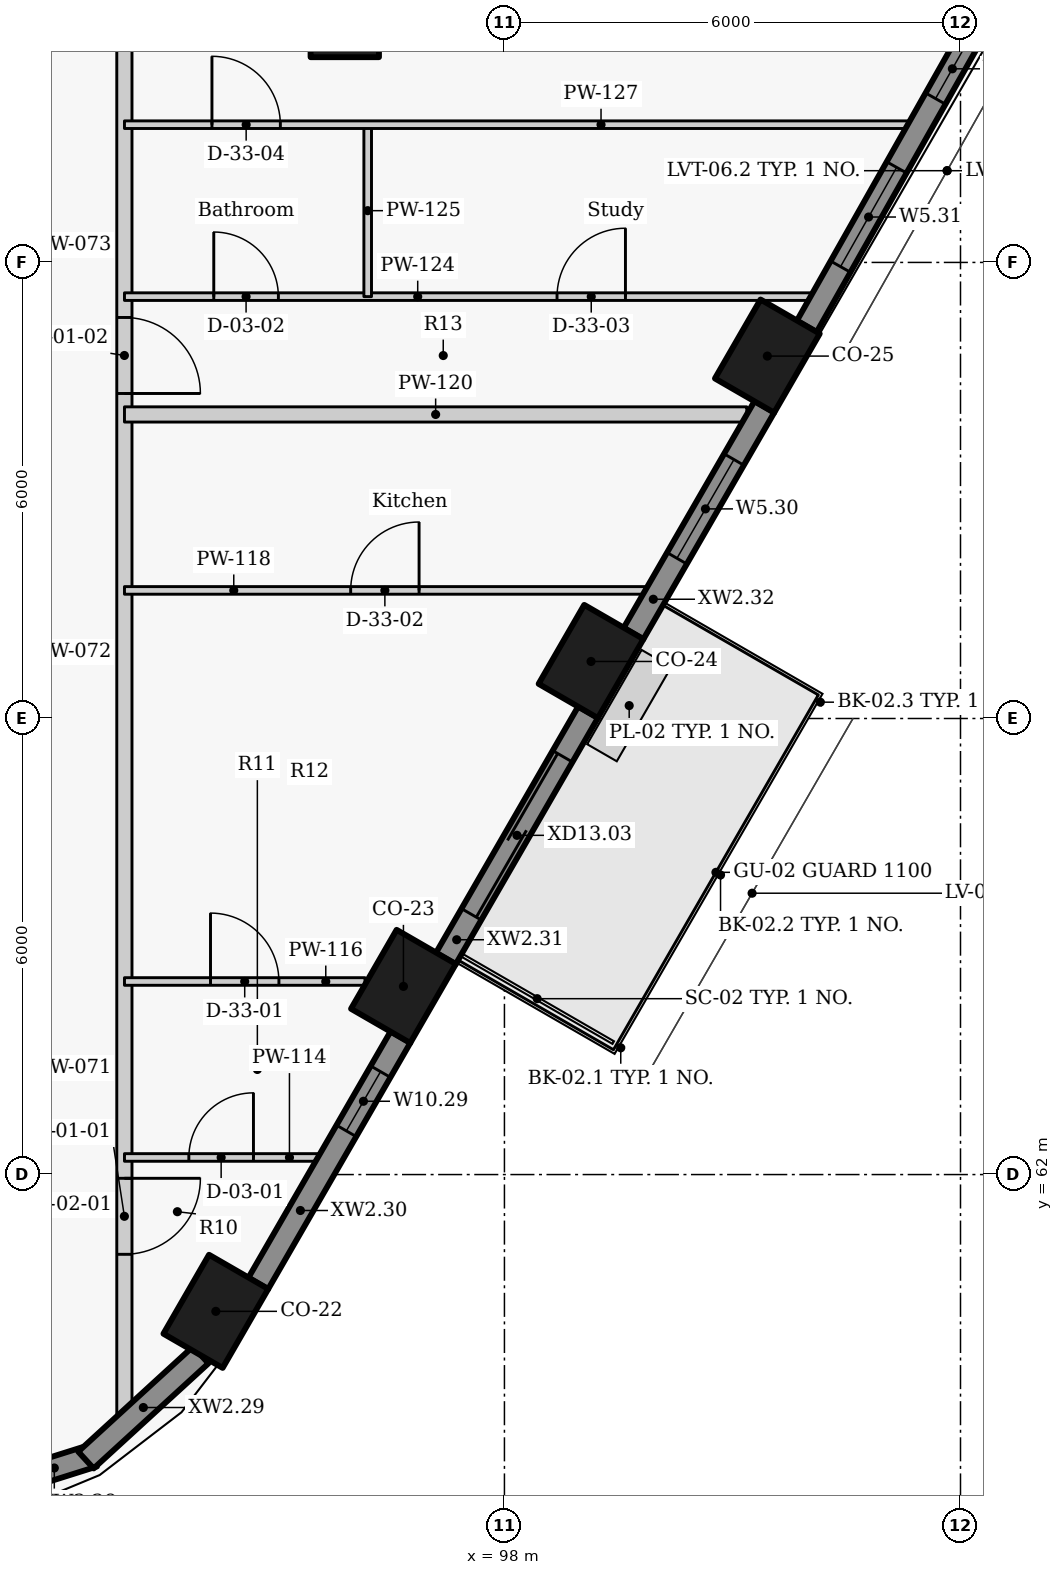
"""IFC4 building model, lengths in metres.
Left out: names, types, materials, properties, quantities, classifications, styles, units other than length and angle.
Written with IfcOpenShell. Run it as: python <this file> out.ifc"""

import sys

from ifc_helpers import new_model, si_unit, direction, frame, frame_2d, origin, origin_2d, place, context, subcontext, project, spatial, rectangle, extrude, element, fill, save


model = new_model("IFC4")
c1 = context("Model", 3, precision=1e-05, world=origin(), true_north=direction((0.0, 1.0)))
c2 = subcontext(c1, "Body", "Model", "MODEL_VIEW")
j1 = project(units=[si_unit("LENGTHUNIT", "METRE"), si_unit("PLANEANGLEUNIT", "RADIAN")], contexts=[c1])
p1 = place(None, origin())
s1 = spatial("IfcSite", under=j1, at=p1, CompositionType="ELEMENT")
p2 = place(p1, origin())
s2 = spatial("IfcBuilding", under=s1, at=p2, CompositionType="ELEMENT")
p3 = place(p2, frame((0.0, 0.0, 180.0)))
s3 = spatial("IfcBuildingStorey", under=s2, at=p3, CompositionType="ELEMENT", Elevation=180.0)
for number, where, z_axis, x_axis in (
    (1, (94.203, 60.2, 0.0), (0.0, 0.0, 1.0), (0.5, 0.866, 0.0)),
    (2, (96.671, 64.475, 0.0), (0.0, 0.0, 1.0), (0.5, 0.866, 0.0)),
    (3, (99.139, 68.75, 0.0), (0.0, 0.0, 1.0), (0.5, 0.866, 0.0)),
    (4, (101.459, 72.768, 0.0), (0.0, 0.0, 1.0), (0.5, 0.866, 0.0)),
    (5, (95.899, 77.3, 0.0), (0.0, 0.0, 1.0), (0.0, 1.0, 0.0)),
):
    element("IfcColumn", number, at=place(p3, frame(where, z_axis=z_axis, x_axis=x_axis)), inside=s3, PredefinedType="COLUMN", context=c2, shape_type="SweptSolid", body=[
        extrude(rectangle(XDim=1.2, YDim=0.9, at=origin_2d()), origin(), (0.0, 0.0, 1.0), 3.3),
    ])
p4 = place(p3, frame((90.636, 57.685, 0.0), z_axis=(0.0, 0.0, 1.0), x_axis=(0.95368324118, 0.300812691707, 0.0)))
e6 = element("IfcWall", 6, at=p4, inside=s3, PredefinedType="SOLIDWALL", context=c2, shape_type="SweptSolid", body=[
    extrude(rectangle(XDim=2.053, YDim=0.3, at=frame_2d((1.027, 0.0))), origin(), (0.0, 0.0, 1.0), 2.425),
])
p5 = place(p4, frame((0.271, 0.0, 0.9)))
e7 = element("IfcOpeningElement", 7, at=p5, cuts=e6, PredefinedType="OPENING", context=c2, shape_type="SweptSolid", body=[
    extrude(rectangle(XDim=0.6, YDim=1.1, at=frame_2d((0.3, 0.55))), frame((0.0, 0.16, 0.0), z_axis=(0.0, -1.0, 0.0), x_axis=(1.0, 0.0, 0.0)), (0.0, 0.0, 1.0), 0.32),
])
p6 = place(p3, frame((92.494, 58.244, 0.0), z_axis=(0.0, 0.0, 1.0), x_axis=(0.73764876128, 0.675184645102, 0.0)))
e8 = element("IfcWall", 8, at=p6, inside=s3, PredefinedType="SOLIDWALL", context=c2, shape_type="SweptSolid", body=[
    extrude(rectangle(XDim=2.048, YDim=0.3, at=frame_2d((1.024, 0.0))), origin(), (0.0, 0.0, 1.0), 2.425),
])
p7 = place(p3, frame((94.761, 60.567, 0.0), z_axis=(0.0, 0.0, 1.0), x_axis=(0.499982088007, 0.866035745032, 0.0)))
e9 = element("IfcWall", 9, at=p7, inside=s3, PredefinedType="SOLIDWALL", context=c2, shape_type="SweptSolid", body=[
    extrude(rectangle(XDim=3.744, YDim=0.3, at=frame_2d((1.872, 0.0))), origin(), (0.0, 0.0, 1.0), 2.425),
])
p8 = place(p7, frame((2.319, 0.0, 1.5)))
e10 = element("IfcOpeningElement", 10, at=p8, cuts=e9, PredefinedType="OPENING", context=c2, shape_type="SweptSolid", body=[
    extrude(rectangle(XDim=0.9, YDim=0.5, at=frame_2d((0.45, 0.25))), frame((0.0, 0.16, 0.0), z_axis=(0.0, -1.0, 0.0), x_axis=(1.0, 0.0, 0.0)), (0.0, 0.0, 1.0), 0.32),
])
p9 = place(p3, frame((97.229, 64.842, 0.0), z_axis=(0.0, 0.0, 1.0), x_axis=(0.500059225181, 0.86599120741, 0.0)))
e11 = element("IfcWall", 11, at=p9, inside=s3, PredefinedType="SOLIDWALL", context=c2, shape_type="SweptSolid", body=[
    extrude(rectangle(XDim=3.744, YDim=0.3, at=frame_2d((1.872, 0.0))), origin(), (0.0, 0.0, 1.0), 2.425),
])
p10 = place(p9, frame((0.672, 0.0, 0.0)))
e12 = element("IfcOpeningElement", 12, at=p10, cuts=e11, PredefinedType="OPENING", context=c2, shape_type="SweptSolid", body=[
    extrude(rectangle(XDim=2.4, YDim=2.0, at=frame_2d((1.2, 1.0))), frame((0.0, 0.16, 0.0), z_axis=(0.0, -1.0, 0.0), x_axis=(1.0, 0.0, 0.0)), (0.0, 0.0, 1.0), 0.32),
])
p11 = place(p3, frame((99.697, 69.116, 0.0), z_axis=(0.0, 0.0, 1.0), x_axis=(0.499955427682, 0.866051136095, 0.0)))
e13 = element("IfcWall", 13, at=p11, inside=s3, PredefinedType="SOLIDWALL", context=c2, shape_type="SweptSolid", body=[
    extrude(rectangle(XDim=3.447, YDim=0.3, at=frame_2d((1.724, 0.0))), origin(), (0.0, 0.0, 1.0), 2.425),
])
p12 = place(p11, frame((1.145, 0.0, 0.9)))
e14 = element("IfcOpeningElement", 14, at=p12, cuts=e13, PredefinedType="OPENING", context=c2, shape_type="SweptSolid", body=[
    extrude(rectangle(XDim=1.5, YDim=1.1, at=frame_2d((0.75, 0.55))), frame((0.0, 0.16, 0.0), z_axis=(0.0, -1.0, 0.0), x_axis=(1.0, 0.0, 0.0)), (0.0, 0.0, 1.0), 0.32),
])
p13 = place(p3, frame((101.977, 73.157, 0.0), z_axis=(0.0, 0.0, 1.0), x_axis=(0.492033360928, 0.870576344575, 0.0)))
e15 = element("IfcWall", 15, at=p13, inside=s3, PredefinedType="SOLIDWALL", context=c2, shape_type="SweptSolid", body=[
    extrude(rectangle(XDim=5.387, YDim=0.3, at=frame_2d((2.693, 0.0))), origin(), (0.0, 0.0, 1.0), 2.425),
])
p14 = place(p13, frame((0.905, 0.0, 0.9)))
e16 = element("IfcOpeningElement", 16, at=p14, cuts=e15, PredefinedType="OPENING", context=c2, shape_type="SweptSolid", body=[
    extrude(rectangle(XDim=1.5, YDim=1.1, at=frame_2d((0.75, 0.55))), frame((0.0, 0.16, 0.0), z_axis=(0.0, -1.0, 0.0), x_axis=(1.0, 0.0, 0.0)), (0.0, 0.0, 1.0), 0.32),
])
p15 = place(p13, frame((3.444, 0.0, 0.9)))
e17 = element("IfcOpeningElement", 17, at=p15, cuts=e15, PredefinedType="OPENING", context=c2, shape_type="SweptSolid", body=[
    extrude(rectangle(XDim=0.9, YDim=1.1, at=frame_2d((0.45, 0.55))), frame((0.0, 0.16, 0.0), z_axis=(0.0, -1.0, 0.0), x_axis=(1.0, 0.0, 0.0)), (0.0, 0.0, 1.0), 0.32),
])
p16 = place(p3, frame((93.0, 101.281, 0.0), z_axis=(0.0, 0.0, 1.0), x_axis=(0.0, -1.0, 0.0)))
e18 = element("IfcWall", 18, at=p16, inside=s3, PredefinedType="PARTITIONING", context=c2, shape_type="SweptSolid", body=[
    extrude(rectangle(XDim=42.606, YDim=0.2, at=frame_2d((21.303, 0.0))), origin(), (0.0, 0.0, 1.0), 2.405),
])
p17 = place(p16, frame((39.33, 0.0, 0.0)))
e19 = element("IfcOpeningElement", 19, at=p17, cuts=e18, PredefinedType="OPENING", context=c2, shape_type="SweptSolid", body=[
    extrude(rectangle(XDim=1.0, YDim=2.1, at=frame_2d((0.5, 1.05))), frame((0.0, 0.11, 0.0), z_axis=(0.0, -1.0, 0.0), x_axis=(1.0, 0.0, 0.0)), (0.0, 0.0, 1.0), 0.22),
])
p18 = place(p16, frame((28.005, 0.0, 0.0)))
e20 = element("IfcOpeningElement", 20, at=p18, cuts=e18, PredefinedType="OPENING", context=c2, shape_type="SweptSolid", body=[
    extrude(rectangle(XDim=1.0, YDim=2.1, at=frame_2d((0.5, 1.05))), frame((0.0, 0.11, 0.0), z_axis=(0.0, -1.0, 0.0), x_axis=(1.0, 0.0, 0.0)), (0.0, 0.0, 1.0), 0.22),
])
p19 = place(p16, frame((16.905, 0.0, 0.0)))
e21 = element("IfcOpeningElement", 21, at=p19, cuts=e18, PredefinedType="OPENING", context=c2, shape_type="SweptSolid", body=[
    extrude(rectangle(XDim=1.0, YDim=2.1, at=frame_2d((0.5, 1.05))), frame((0.0, 0.11, 0.0), z_axis=(0.0, -1.0, 0.0), x_axis=(1.0, 0.0, 0.0)), (0.0, 0.0, 1.0), 0.22),
])
p20 = place(p3, frame((93.001, 62.225, 0.0), z_axis=(0.0, 0.0, 1.0), x_axis=(1.0, 0.0, 0.0)))
e22 = element("IfcWall", 22, at=p20, inside=s3, PredefinedType="PARTITIONING", context=c2, shape_type="SweptSolid", body=[
    extrude(rectangle(XDim=2.544, YDim=0.1, at=frame_2d((1.272, 0.0))), origin(), (0.0, 0.0, 1.0), 2.405),
])
p21 = place(p20, frame((0.847, 0.0, 0.0)))
e23 = element("IfcOpeningElement", 23, at=p21, cuts=e22, PredefinedType="OPENING", context=c2, shape_type="SweptSolid", body=[
    extrude(rectangle(XDim=0.85, YDim=2.1, at=frame_2d((0.425, 1.05))), frame((0.0, 0.06, 0.0), z_axis=(0.0, -1.0, 0.0), x_axis=(1.0, 0.0, 0.0)), (0.0, 0.0, 1.0), 0.12),
])
p22 = place(p3, frame((93.001, 64.54, 0.0), z_axis=(0.0, 0.0, 1.0), x_axis=(1.0, 0.0, 0.0)))
e24 = element("IfcWall", 24, at=p22, inside=s3, PredefinedType="PARTITIONING", context=c2, shape_type="SweptSolid", body=[
    extrude(rectangle(XDim=3.165, YDim=0.1, at=frame_2d((1.583, 0.0))), origin(), (0.0, 0.0, 1.0), 3.025),
])
p23 = place(p22, frame((1.132, 0.0, 0.0)))
e25 = element("IfcOpeningElement", 25, at=p23, cuts=e24, PredefinedType="OPENING", context=c2, shape_type="SweptSolid", body=[
    extrude(rectangle(XDim=0.9, YDim=2.1, at=frame_2d((0.45, 1.05))), frame((0.0, 0.06, 0.0), z_axis=(0.0, -1.0, 0.0), x_axis=(1.0, 0.0, 0.0)), (0.0, 0.0, 1.0), 0.12),
])
p24 = place(p3, frame((93.001, 69.685, 0.0), z_axis=(0.0, 0.0, 1.0), x_axis=(1.0, 0.0, 0.0)))
e26 = element("IfcWall", 26, at=p24, inside=s3, PredefinedType="PARTITIONING", context=c2, shape_type="SweptSolid", body=[
    extrude(rectangle(XDim=6.851, YDim=0.1, at=frame_2d((3.426, 0.0))), origin(), (0.0, 0.0, 1.0), 2.405),
])
p25 = place(p24, frame((2.976, 0.0, 0.0)))
e27 = element("IfcOpeningElement", 27, at=p25, cuts=e26, PredefinedType="OPENING", context=c2, shape_type="SweptSolid", body=[
    extrude(rectangle(XDim=0.9, YDim=2.1, at=frame_2d((0.45, 1.05))), frame((0.0, 0.06, 0.0), z_axis=(0.0, -1.0, 0.0), x_axis=(1.0, 0.0, 0.0)), (0.0, 0.0, 1.0), 0.12),
])
p26 = place(p3, frame((93.001, 72.0, 0.0), z_axis=(0.0, 0.0, 1.0), x_axis=(1.0, 0.0, 0.0)))
e28 = element("IfcWall", 28, at=p26, inside=s3, PredefinedType="PARTITIONING", context=c2, shape_type="SweptSolid", body=[
    extrude(rectangle(XDim=8.188, YDim=0.2, at=frame_2d((4.094, 0.0))), origin(), (0.0, 0.0, 1.0), 2.405),
])
p27 = place(p3, frame((93.001, 73.55, 0.0), z_axis=(0.0, 0.0, 1.0), x_axis=(1.0, 0.0, 0.0)))
e29 = element("IfcWall", 29, at=p27, inside=s3, PredefinedType="PARTITIONING", context=c2, shape_type="SweptSolid", body=[
    extrude(rectangle(XDim=9.083, YDim=0.1, at=frame_2d((4.542, 0.0))), origin(), (0.0, 0.0, 1.0), 2.405),
])
p28 = place(p27, frame((1.175, 0.0, 0.0)))
e30 = element("IfcOpeningElement", 30, at=p28, cuts=e29, PredefinedType="OPENING", context=c2, shape_type="SweptSolid", body=[
    extrude(rectangle(XDim=0.85, YDim=2.1, at=frame_2d((0.425, 1.05))), frame((0.0, 0.06, 0.0), z_axis=(0.0, -1.0, 0.0), x_axis=(1.0, 0.0, 0.0)), (0.0, 0.0, 1.0), 0.12),
])
p29 = place(p27, frame((5.691, 0.0, 0.0)))
e31 = element("IfcOpeningElement", 31, at=p29, cuts=e29, PredefinedType="OPENING", context=c2, shape_type="SweptSolid", body=[
    extrude(rectangle(XDim=0.9, YDim=2.1, at=frame_2d((0.45, 1.05))), frame((0.0, 0.06, 0.0), z_axis=(0.0, -1.0, 0.0), x_axis=(1.0, 0.0, 0.0)), (0.0, 0.0, 1.0), 0.12),
])
p30 = place(p3, frame((96.201, 73.55, 0.0), z_axis=(0.0, 0.0, 1.0), x_axis=(0.0, 1.0, 0.0)))
e32 = element("IfcWall", 32, at=p30, inside=s3, PredefinedType="PARTITIONING", context=c2, shape_type="SweptSolid", body=[
    extrude(rectangle(XDim=2.262, YDim=0.1, at=frame_2d((1.131, 0.0))), origin(), (0.0, 0.0, 1.0), 3.025),
])
p31 = place(p3, frame((93.001, 75.812, 0.0), z_axis=(0.0, 0.0, 1.0), x_axis=(1.0, 0.0, 0.0)))
e33 = element("IfcWall", 33, at=p31, inside=s3, PredefinedType="PARTITIONING", context=c2, shape_type="SweptSolid", body=[
    extrude(rectangle(XDim=10.389, YDim=0.1, at=frame_2d((5.194, 0.0))), origin(), (0.0, 0.0, 1.0), 2.405),
])
p32 = place(p31, frame((1.151, 0.0, 0.0)))
e34 = element("IfcOpeningElement", 34, at=p32, cuts=e33, PredefinedType="OPENING", context=c2, shape_type="SweptSolid", body=[
    extrude(rectangle(XDim=0.9, YDim=2.1, at=frame_2d((0.45, 1.05))), frame((0.0, 0.06, 0.0), z_axis=(0.0, -1.0, 0.0), x_axis=(1.0, 0.0, 0.0)), (0.0, 0.0, 1.0), 0.12),
])
p33 = place(p8, origin())
e35 = element("IfcWindow", 35, at=p33, inside=s3, PartitioningType="SINGLE_PANEL", PredefinedType="WINDOW", context=c2, shape_type="SweptSolid", body=[
    extrude(rectangle(XDim=0.9, YDim=0.5, at=frame_2d((0.45, 0.25))), frame((0.0, 0.03, 0.0), z_axis=(0.0, -1.0, 0.0), x_axis=(1.0, 0.0, 0.0)), (0.0, 0.0, 1.0), 0.06),
])
fill(e10, e35)
p34 = place(p10, origin())
e36 = element("IfcDoor", 36, at=p34, inside=s3, OperationType="DOUBLE_DOOR_SLIDING", PredefinedType="DOOR", context=c2, shape_type="SweptSolid", body=[
    extrude(rectangle(XDim=2.4, YDim=2.0, at=frame_2d((1.2, 1.0))), frame((0.0, 0.025, 0.0), z_axis=(0.0, -1.0, 0.0), x_axis=(1.0, 0.0, 0.0)), (0.0, 0.0, 1.0), 0.05),
])
fill(e12, e36)
p35 = place(p12, origin())
e37 = element("IfcWindow", 37, at=p35, inside=s3, PartitioningType="SINGLE_PANEL", PredefinedType="WINDOW", context=c2, shape_type="SweptSolid", body=[
    extrude(rectangle(XDim=1.5, YDim=1.1, at=frame_2d((0.75, 0.55))), frame((0.0, 0.03, 0.0), z_axis=(0.0, -1.0, 0.0), x_axis=(1.0, 0.0, 0.0)), (0.0, 0.0, 1.0), 0.06),
])
fill(e14, e37)
p36 = place(p14, origin())
e38 = element("IfcWindow", 38, at=p36, inside=s3, PartitioningType="SINGLE_PANEL", PredefinedType="WINDOW", context=c2, shape_type="SweptSolid", body=[
    extrude(rectangle(XDim=1.5, YDim=1.1, at=frame_2d((0.75, 0.55))), frame((0.0, 0.03, 0.0), z_axis=(0.0, -1.0, 0.0), x_axis=(1.0, 0.0, 0.0)), (0.0, 0.0, 1.0), 0.06),
])
fill(e16, e38)
p37 = place(p15, origin())
e39 = element("IfcWindow", 39, at=p37, inside=s3, PartitioningType="SINGLE_PANEL", PredefinedType="WINDOW", context=c2, shape_type="SweptSolid", body=[
    extrude(rectangle(XDim=0.9, YDim=1.1, at=frame_2d((0.45, 0.55))), frame((0.0, 0.03, 0.0), z_axis=(0.0, -1.0, 0.0), x_axis=(1.0, 0.0, 0.0)), (0.0, 0.0, 1.0), 0.06),
])
fill(e17, e39)
p38 = place(p17, origin())
e40 = element("IfcDoor", 40, at=p38, inside=s3, OperationType="SINGLE_SWING_LEFT", PredefinedType="DOOR", context=c2, shape_type="SweptSolid", body=[
    extrude(rectangle(XDim=1.0, YDim=2.1, at=frame_2d((0.5, 1.05))), frame((0.0, 0.025, 0.0), z_axis=(0.0, -1.0, 0.0), x_axis=(1.0, 0.0, 0.0)), (0.0, 0.0, 1.0), 0.05),
])
fill(e19, e40)
p39 = place(p21, origin())
e41 = element("IfcDoor", 41, at=p39, inside=s3, OperationType="SINGLE_SWING_RIGHT", PredefinedType="DOOR", context=c2, shape_type="SweptSolid", body=[
    extrude(rectangle(XDim=0.85, YDim=2.1, at=frame_2d((0.425, 1.05))), frame((0.0, 0.025, 0.0), z_axis=(0.0, -1.0, 0.0), x_axis=(1.0, 0.0, 0.0)), (0.0, 0.0, 1.0), 0.05),
])
fill(e23, e41)
p40 = place(p23, origin())
e42 = element("IfcDoor", 42, at=p40, inside=s3, OperationType="SINGLE_SWING_LEFT", PredefinedType="DOOR", context=c2, shape_type="SweptSolid", body=[
    extrude(rectangle(XDim=0.9, YDim=2.1, at=frame_2d((0.45, 1.05))), frame((0.0, 0.025, 0.0), z_axis=(0.0, -1.0, 0.0), x_axis=(1.0, 0.0, 0.0)), (0.0, 0.0, 1.0), 0.05),
])
fill(e25, e42)
p41 = place(p25, origin())
e43 = element("IfcDoor", 43, at=p41, inside=s3, OperationType="SINGLE_SWING_RIGHT", PredefinedType="DOOR", context=c2, shape_type="SweptSolid", body=[
    extrude(rectangle(XDim=0.9, YDim=2.1, at=frame_2d((0.45, 1.05))), frame((0.0, 0.025, 0.0), z_axis=(0.0, -1.0, 0.0), x_axis=(1.0, 0.0, 0.0)), (0.0, 0.0, 1.0), 0.05),
])
fill(e27, e43)
p42 = place(p18, origin())
e44 = element("IfcDoor", 44, at=p42, inside=s3, OperationType="SINGLE_SWING_RIGHT", PredefinedType="DOOR", context=c2, shape_type="SweptSolid", body=[
    extrude(rectangle(XDim=1.0, YDim=2.1, at=frame_2d((0.5, 1.05))), frame((0.0, 0.025, 0.0), z_axis=(0.0, -1.0, 0.0), x_axis=(1.0, 0.0, 0.0)), (0.0, 0.0, 1.0), 0.05),
])
fill(e20, e44)
p43 = place(p28, origin())
e45 = element("IfcDoor", 45, at=p43, inside=s3, OperationType="SINGLE_SWING_LEFT", PredefinedType="DOOR", context=c2, shape_type="SweptSolid", body=[
    extrude(rectangle(XDim=0.85, YDim=2.1, at=frame_2d((0.425, 1.05))), frame((0.0, 0.025, 0.0), z_axis=(0.0, -1.0, 0.0), x_axis=(1.0, 0.0, 0.0)), (0.0, 0.0, 1.0), 0.05),
])
fill(e30, e45)
p44 = place(p29, origin())
e46 = element("IfcDoor", 46, at=p44, inside=s3, OperationType="SINGLE_SWING_RIGHT", PredefinedType="DOOR", context=c2, shape_type="SweptSolid", body=[
    extrude(rectangle(XDim=0.9, YDim=2.1, at=frame_2d((0.45, 1.05))), frame((0.0, 0.025, 0.0), z_axis=(0.0, -1.0, 0.0), x_axis=(1.0, 0.0, 0.0)), (0.0, 0.0, 1.0), 0.05),
])
fill(e31, e46)
p45 = place(p32, origin())
e47 = element("IfcDoor", 47, at=p45, inside=s3, OperationType="SINGLE_SWING_LEFT", PredefinedType="DOOR", context=c2, shape_type="SweptSolid", body=[
    extrude(rectangle(XDim=0.9, YDim=2.1, at=frame_2d((0.45, 1.05))), frame((0.0, 0.025, 0.0), z_axis=(0.0, -1.0, 0.0), x_axis=(1.0, 0.0, 0.0)), (0.0, 0.0, 1.0), 0.05),
])
fill(e34, e47)
save(model, sys.argv[1])
